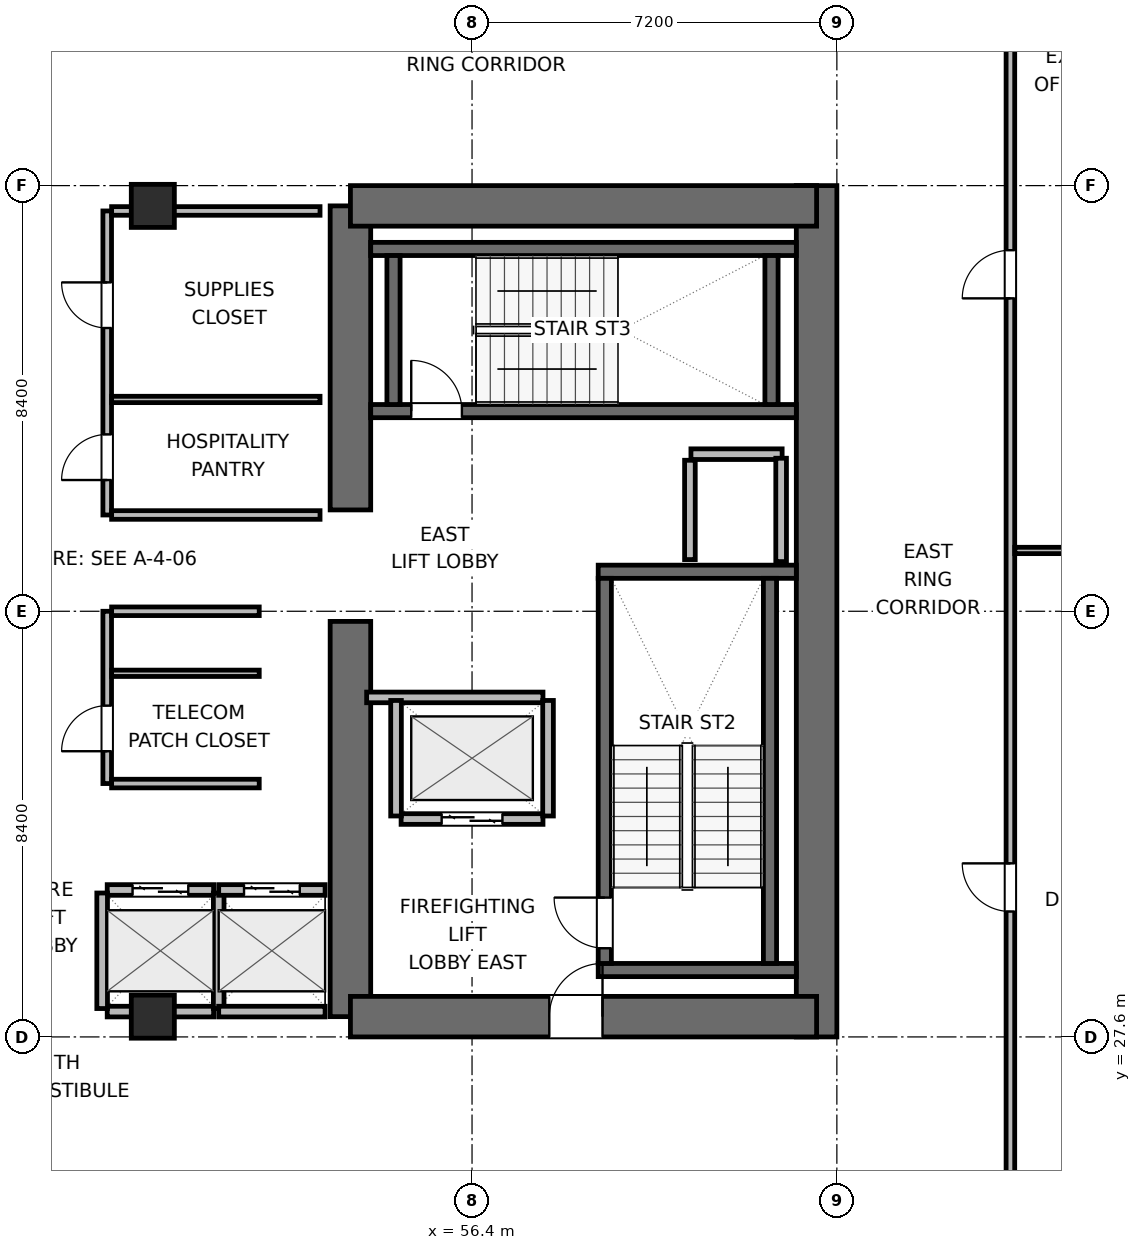
"""IFC4 building model, lengths in metres.
Left out: names, types, materials, properties, quantities, classifications, styles, units other than length and angle.
Written with IfcOpenShell. Run it as: python <this file> out.ifc"""

import sys

from ifc_helpers import new_model, si_unit, direction, frame, frame_2d, origin, origin_2d, place, context, subcontext, project, spatial, rectangle, extrude, element, fill, save


model = new_model("IFC4")
c1 = context("Model", 3, precision=1e-05, world=origin(), true_north=direction((0.0, 1.0)))
c2 = subcontext(c1, "Body", "Model", "MODEL_VIEW")
j1 = project(units=[si_unit("LENGTHUNIT", "METRE"), si_unit("PLANEANGLEUNIT", "RADIAN")], contexts=[c1])
p1 = place(None, origin())
s1 = spatial("IfcSite", under=j1, at=p1, CompositionType="ELEMENT")
p2 = place(p1, origin())
s2 = spatial("IfcBuilding", under=s1, at=p2, CompositionType="ELEMENT")
p3 = place(p2, frame((0.0, 0.0, 101.4)))
s3 = spatial("IfcBuildingStorey", under=s2, at=p3, CompositionType="ELEMENT", Elevation=101.4)
p4 = place(p3, frame((54.0, 28.0, 0.0), z_axis=(0.0, 0.0, 1.0), x_axis=(0.0, 1.0, 0.0)))
e1 = element("IfcWall", 1, at=p4, inside=s3, PredefinedType="SHEAR", context=c2, shape_type="SweptSolid", body=[
    extrude(rectangle(XDim=7.8, YDim=0.8, at=frame_2d((3.9, 0.0))), origin(), (0.0, 0.0, 1.0), 3.9),
])
p5 = place(p3, frame((54.0, 38.0, 0.0), z_axis=(0.0, 0.0, 1.0), x_axis=(0.0, 1.0, 0.0)))
e2 = element("IfcWall", 2, at=p5, inside=s3, PredefinedType="SHEAR", context=c2, shape_type="SweptSolid", body=[
    extrude(rectangle(XDim=6.0, YDim=0.8, at=frame_2d((3.0, 0.0))), origin(), (0.0, 0.0, 1.0), 3.9),
])
p6 = place(p3, frame((63.2, 27.6, 0.0), z_axis=(0.0, 0.0, 1.0), x_axis=(0.0, 1.0, 0.0)))
e3 = element("IfcWall", 3, at=p6, inside=s3, PredefinedType="SHEAR", context=c2, shape_type="SweptSolid", body=[
    extrude(rectangle(XDim=16.8, YDim=0.8, at=frame_2d((8.4, 0.0))), origin(), (0.0, 0.0, 1.0), 3.9),
])
p7 = place(p3, frame((54.0, 28.0, 0.0), z_axis=(0.0, 0.0, 1.0), x_axis=(1.0, 0.0, 0.0)))
e4 = element("IfcWall", 4, at=p7, inside=s3, PredefinedType="SHEAR", context=c2, shape_type="SweptSolid", body=[
    extrude(rectangle(XDim=9.2, YDim=0.8, at=frame_2d((4.6, 0.0))), origin(), (0.0, 0.0, 1.0), 3.9),
])
p8 = place(p7, frame((3.925, 0.0, 0.0)))
e5 = element("IfcOpeningElement", 5, at=p8, cuts=e4, PredefinedType="OPENING", context=c2, shape_type="SweptSolid", body=[
    extrude(rectangle(XDim=1.05, YDim=2.04, at=frame_2d((0.525, 1.02))), frame((0.0, 0.41, 0.0), z_axis=(0.0, -1.0, 0.0), x_axis=(1.0, 0.0, 0.0)), (0.0, 0.0, 1.0), 0.82),
])
p9 = place(p3, frame((54.0, 44.0, 0.0), z_axis=(0.0, 0.0, 1.0), x_axis=(1.0, 0.0, 0.0)))
e6 = element("IfcWall", 6, at=p9, inside=s3, PredefinedType="SHEAR", context=c2, shape_type="SweptSolid", body=[
    extrude(rectangle(XDim=9.2, YDim=0.8, at=frame_2d((4.6, 0.0))), origin(), (0.0, 0.0, 1.0), 3.9),
])
for number, where, z_axis, x_axis in (
    (7, (58.89, 28.92, 0.0), (0.0, 0.0, 1.0), (1.0, 0.0, 0.0)),
    (8, (58.89, 36.78, 0.0), (0.0, 0.0, 1.0), (1.0, 0.0, 0.0)),
):
    element("IfcWall", number, at=place(p3, frame(where, z_axis=z_axis, x_axis=x_axis)), inside=s3, PredefinedType="SHEAR", context=c2, shape_type="SweptSolid", body=[
        extrude(rectangle(XDim=3.91, YDim=0.26, at=frame_2d((1.955, 0.0))), origin(), (0.0, 0.0, 1.0), 3.9),
    ])
p10 = place(p3, frame((59.02, 29.05, 0.0), z_axis=(0.0, 0.0, 1.0), x_axis=(0.0, 1.0, 0.0)))
e9 = element("IfcWall", 9, at=p10, inside=s3, PredefinedType="SHEAR", context=c2, shape_type="SweptSolid", body=[
    extrude(rectangle(XDim=7.6, YDim=0.26, at=frame_2d((3.8, 0.0))), origin(), (0.0, 0.0, 1.0), 3.9),
])
p11 = place(p10, frame((0.3, 0.0, 0.0)))
e10 = element("IfcOpeningElement", 10, at=p11, cuts=e9, PredefinedType="OPENING", context=c2, shape_type="SweptSolid", body=[
    extrude(rectangle(XDim=1.0, YDim=2.04, at=frame_2d((0.5, 1.02))), frame((0.0, 0.14, 0.0), z_axis=(0.0, -1.0, 0.0), x_axis=(1.0, 0.0, 0.0)), (0.0, 0.0, 1.0), 0.28),
])
p12 = place(p3, frame((62.28, 29.05, 0.0), z_axis=(0.0, 0.0, 1.0), x_axis=(0.0, 1.0, 0.0)))
e11 = element("IfcWall", 11, at=p12, inside=s3, PredefinedType="SHEAR", context=c2, shape_type="SweptSolid", body=[
    extrude(rectangle(XDim=7.6, YDim=0.26, at=frame_2d((3.8, 0.0))), origin(), (0.0, 0.0, 1.0), 3.9),
])
p13 = place(p3, frame((54.4, 39.95, 0.0), z_axis=(0.0, 0.0, 1.0), x_axis=(1.0, 0.0, 0.0)))
e12 = element("IfcWall", 12, at=p13, inside=s3, PredefinedType="SHEAR", context=c2, shape_type="SweptSolid", body=[
    extrude(rectangle(XDim=8.4, YDim=0.26, at=frame_2d((4.2, 0.0))), origin(), (0.0, 0.0, 1.0), 3.9),
])
p14 = place(p13, frame((0.8, 0.0, 0.0)))
e13 = element("IfcOpeningElement", 13, at=p14, cuts=e12, PredefinedType="OPENING", context=c2, shape_type="SweptSolid", body=[
    extrude(rectangle(XDim=1.0, YDim=2.04, at=frame_2d((0.5, 1.02))), frame((0.0, 0.14, 0.0), z_axis=(0.0, -1.0, 0.0), x_axis=(1.0, 0.0, 0.0)), (0.0, 0.0, 1.0), 0.28),
])
p15 = place(p3, frame((54.4, 43.15, 0.0), z_axis=(0.0, 0.0, 1.0), x_axis=(1.0, 0.0, 0.0)))
e14 = element("IfcWall", 14, at=p15, inside=s3, PredefinedType="SHEAR", context=c2, shape_type="SweptSolid", body=[
    extrude(rectangle(XDim=8.4, YDim=0.26, at=frame_2d((4.2, 0.0))), origin(), (0.0, 0.0, 1.0), 3.9),
])
for number, where, z_axis, x_axis in (
    (15, (54.85, 40.08, 0.0), (0.0, 0.0, 1.0), (0.0, 1.0, 0.0)),
    (16, (62.31, 40.08, 0.0), (0.0, 0.0, 1.0), (0.0, 1.0, 0.0)),
):
    element("IfcWall", number, at=place(p3, frame(where, z_axis=z_axis, x_axis=x_axis)), inside=s3, PredefinedType="SHEAR", context=c2, shape_type="SweptSolid", body=[
        extrude(rectangle(XDim=2.94, YDim=0.26, at=frame_2d((1.47, 0.0))), origin(), (0.0, 0.0, 1.0), 3.9),
    ])
for number, where, z_axis, x_axis in (
    (17, (50.1, 28.0, 0.0), (0.0, 0.0, 1.0), (1.0, 0.0, 0.0)),
    (18, (50.1, 44.0, 0.0), (0.0, 0.0, 1.0), (1.0, 0.0, 0.0)),
):
    element("IfcColumn", number, at=place(p3, frame(where, z_axis=z_axis, x_axis=x_axis)), inside=s3, PredefinedType="COLUMN", context=c2, shape_type="SweptSolid", body=[
        extrude(rectangle(XDim=0.85, YDim=0.85, at=origin_2d()), origin(), (0.0, 0.0, 1.0), 3.9),
    ])
p16 = place(p3, frame((60.72, 39.1, 0.0), z_axis=(0.0, 0.0, 1.0), x_axis=(1.0, 0.0, 0.0)))
e19 = element("IfcWall", 19, at=p16, inside=s3, PredefinedType="PARTITIONING", context=c2, shape_type="SweptSolid", body=[
    extrude(rectangle(XDim=1.8, YDim=0.21, at=frame_2d((0.9, 0.0))), origin(), (0.0, 0.0, 1.0), 3.64),
])
p17 = place(p3, frame((60.7, 37.02, 0.0), z_axis=(0.0, 0.0, 1.0), x_axis=(0.0, 1.0, 0.0)))
e20 = element("IfcWall", 20, at=p17, inside=s3, PredefinedType="PARTITIONING", context=c2, shape_type="SweptSolid", body=[
    extrude(rectangle(XDim=1.96, YDim=0.21, at=frame_2d((0.98, 0.0))), origin(), (0.0, 0.0, 1.0), 3.64),
])
p18 = place(p3, frame((62.5, 36.98, 0.0), z_axis=(0.0, 0.0, 1.0), x_axis=(0.0, 1.0, 0.0)))
e21 = element("IfcWall", 21, at=p18, inside=s3, PredefinedType="PARTITIONING", context=c2, shape_type="SweptSolid", body=[
    extrude(rectangle(XDim=2.04, YDim=0.21, at=frame_2d((1.02, 0.0))), origin(), (0.0, 0.0, 1.0), 3.64),
])
p19 = place(p3, frame((55.0, 31.9, 0.0), z_axis=(0.0, 0.0, 1.0), x_axis=(1.0, 0.0, 0.0)))
e22 = element("IfcWall", 22, at=p19, inside=s3, PredefinedType="PARTITIONING", context=c2, shape_type="SweptSolid", body=[
    extrude(rectangle(XDim=2.8, YDim=0.21, at=frame_2d((1.4, 0.0))), origin(), (0.0, 0.0, 1.0), 3.64),
])
p20 = place(p19, frame((0.8, 0.0, 0.0)))
e23 = element("IfcOpeningElement", 23, at=p20, cuts=e22, PredefinedType="OPENING", context=c2, shape_type="SweptSolid", body=[
    extrude(rectangle(XDim=1.2, YDim=2.04, at=frame_2d((0.6, 1.02))), frame((0.0, 0.115, 0.0), z_axis=(0.0, -1.0, 0.0), x_axis=(1.0, 0.0, 0.0)), (0.0, 0.0, 1.0), 0.23),
])
p21 = place(p3, frame((54.32, 34.3, 0.0), z_axis=(0.0, 0.0, 1.0), x_axis=(1.0, 0.0, 0.0)))
e24 = element("IfcWall", 24, at=p21, inside=s3, PredefinedType="PARTITIONING", context=c2, shape_type="SweptSolid", body=[
    extrude(rectangle(XDim=3.48, YDim=0.21, at=frame_2d((1.74, 0.0))), origin(), (0.0, 0.0, 1.0), 3.64),
])
for number, where, z_axis, x_axis in (
    (25, (54.9, 31.96, 0.0), (0.0, 0.0, 1.0), (0.0, 1.0, 0.0)),
    (26, (57.9, 31.96, 0.0), (0.0, 0.0, 1.0), (0.0, 1.0, 0.0)),
):
    element("IfcWall", number, at=place(p3, frame(where, z_axis=z_axis, x_axis=x_axis)), inside=s3, PredefinedType="PARTITIONING", context=c2, shape_type="SweptSolid", body=[
        extrude(rectangle(XDim=2.28, YDim=0.21, at=frame_2d((1.14, 0.0))), origin(), (0.0, 0.0, 1.0), 3.64),
    ])
p22 = place(p3, frame((49.2, 30.5, 0.0), z_axis=(0.0, 0.0, 1.0), x_axis=(1.0, 0.0, 0.0)))
e27 = element("IfcWall", 27, at=p22, inside=s3, PredefinedType="PARTITIONING", context=c2, shape_type="SweptSolid", body=[
    extrude(rectangle(XDim=2.1, YDim=0.21, at=frame_2d((1.05, 0.0))), origin(), (0.0, 0.0, 1.0), 3.64),
])
p23 = place(p22, frame((0.5, 0.0, 0.0)))
e28 = element("IfcOpeningElement", 28, at=p23, cuts=e27, PredefinedType="OPENING", context=c2, shape_type="SweptSolid", body=[
    extrude(rectangle(XDim=1.1, YDim=2.04, at=frame_2d((0.55, 1.02))), frame((0.0, 0.115, 0.0), z_axis=(0.0, -1.0, 0.0), x_axis=(1.0, 0.0, 0.0)), (0.0, 0.0, 1.0), 0.23),
])
p24 = place(p3, frame((49.2, 28.1, 0.0), z_axis=(0.0, 0.0, 1.0), x_axis=(1.0, 0.0, 0.0)))
e29 = element("IfcWall", 29, at=p24, inside=s3, PredefinedType="PARTITIONING", context=c2, shape_type="SweptSolid", body=[
    extrude(rectangle(XDim=2.1, YDim=0.21, at=frame_2d((1.05, 0.0))), origin(), (0.0, 0.0, 1.0), 2.525),
])
for number, where, z_axis, x_axis in (
    (30, (49.1, 28.16, 0.0), (0.0, 0.0, 1.0), (0.0, 1.0, 0.0)),
    (31, (51.4, 28.16, 0.0), (0.0, 0.0, 1.0), (0.0, 1.0, 0.0)),
):
    element("IfcWall", number, at=place(p3, frame(where, z_axis=z_axis, x_axis=x_axis)), inside=s3, PredefinedType="PARTITIONING", context=c2, shape_type="SweptSolid", body=[
        extrude(rectangle(XDim=2.28, YDim=0.21, at=frame_2d((1.14, 0.0))), origin(), (0.0, 0.0, 1.0), 3.64),
    ])
p25 = place(p3, frame((51.4, 30.5, 0.0), z_axis=(0.0, 0.0, 1.0), x_axis=(1.0, 0.0, 0.0)))
e32 = element("IfcWall", 32, at=p25, inside=s3, PredefinedType="PARTITIONING", context=c2, shape_type="SweptSolid", body=[
    extrude(rectangle(XDim=2.1, YDim=0.21, at=frame_2d((1.05, 0.0))), origin(), (0.0, 0.0, 1.0), 3.64),
])
p26 = place(p25, frame((0.5, 0.0, 0.0)))
e33 = element("IfcOpeningElement", 33, at=p26, cuts=e32, PredefinedType="OPENING", context=c2, shape_type="SweptSolid", body=[
    extrude(rectangle(XDim=1.1, YDim=2.04, at=frame_2d((0.55, 1.02))), frame((0.0, 0.115, 0.0), z_axis=(0.0, -1.0, 0.0), x_axis=(1.0, 0.0, 0.0)), (0.0, 0.0, 1.0), 0.23),
])
p27 = place(p3, frame((51.4, 28.1, 0.0), z_axis=(0.0, 0.0, 1.0), x_axis=(1.0, 0.0, 0.0)))
e34 = element("IfcWall", 34, at=p27, inside=s3, PredefinedType="PARTITIONING", context=c2, shape_type="SweptSolid", body=[
    extrude(rectangle(XDim=2.1, YDim=0.21, at=frame_2d((1.05, 0.0))), origin(), (0.0, 0.0, 1.0), 2.525),
])
p28 = place(p3, frame((49.2, 32.6, 0.0), z_axis=(0.0, 0.0, 1.0), x_axis=(0.0, 1.0, 0.0)))
e35 = element("IfcWall", 35, at=p28, inside=s3, PredefinedType="PARTITIONING", context=c2, shape_type="SweptSolid", body=[
    extrude(rectangle(XDim=3.4, YDim=0.17, at=frame_2d((1.7, 0.0))), origin(), (0.0, 0.0, 1.0), 3.64),
])
p29 = place(p28, frame((0.638, 0.0, 0.0)))
e36 = element("IfcOpeningElement", 36, at=p29, cuts=e35, PredefinedType="OPENING", context=c2, shape_type="SweptSolid", body=[
    extrude(rectangle(XDim=0.9, YDim=2.02, at=frame_2d((0.45, 1.01))), frame((0.0, 0.095, 0.0), z_axis=(0.0, -1.0, 0.0), x_axis=(1.0, 0.0, 0.0)), (0.0, 0.0, 1.0), 0.19),
])
for number, where, z_axis, x_axis in (
    (37, (49.287, 32.6, 0.0), (0.0, 0.0, 1.0), (1.0, 0.0, 0.0)),
    (38, (49.287, 36.0, 0.0), (0.0, 0.0, 1.0), (1.0, 0.0, 0.0)),
):
    element("IfcWall", number, at=place(p3, frame(where, z_axis=z_axis, x_axis=x_axis)), inside=s3, PredefinedType="PARTITIONING", context=c2, shape_type="SweptSolid", body=[
        extrude(rectangle(XDim=2.913, YDim=0.17, at=frame_2d((1.457, 0.0))), origin(), (0.0, 0.0, 1.0), 3.64),
    ])
p30 = place(p3, frame((49.287, 34.776, 0.0), z_axis=(0.0, 0.0, 1.0), x_axis=(1.0, 0.0, 0.0)))
e39 = element("IfcWall", 39, at=p30, inside=s3, PredefinedType="PARTITIONING", context=c2, shape_type="SweptSolid", body=[
    extrude(rectangle(XDim=2.913, YDim=0.125, at=frame_2d((1.457, 0.0))), origin(), (0.0, 0.0, 1.0), 3.64),
])
p31 = place(p3, frame((49.2, 37.9, 0.0), z_axis=(0.0, 0.0, 1.0), x_axis=(0.0, 1.0, 0.0)))
e40 = element("IfcWall", 40, at=p31, inside=s3, PredefinedType="PARTITIONING", context=c2, shape_type="SweptSolid", body=[
    extrude(rectangle(XDim=6.0, YDim=0.17, at=frame_2d((3.0, 0.0))), origin(), (0.0, 0.0, 1.0), 3.64),
])
p32 = place(p31, frame((0.69, 0.0, 0.0)))
e41 = element("IfcOpeningElement", 41, at=p32, cuts=e40, PredefinedType="OPENING", context=c2, shape_type="SweptSolid", body=[
    extrude(rectangle(XDim=0.9, YDim=2.02, at=frame_2d((0.45, 1.01))), frame((0.0, 0.095, 0.0), z_axis=(0.0, -1.0, 0.0), x_axis=(1.0, 0.0, 0.0)), (0.0, 0.0, 1.0), 0.19),
])
p33 = place(p31, frame((3.69, 0.0, 0.0)))
e42 = element("IfcOpeningElement", 42, at=p33, cuts=e40, PredefinedType="OPENING", context=c2, shape_type="SweptSolid", body=[
    extrude(rectangle(XDim=0.9, YDim=2.02, at=frame_2d((0.45, 1.01))), frame((0.0, 0.095, 0.0), z_axis=(0.0, -1.0, 0.0), x_axis=(1.0, 0.0, 0.0)), (0.0, 0.0, 1.0), 0.19),
])
p34 = place(p3, frame((49.287, 37.9, 0.0), z_axis=(0.0, 0.0, 1.0), x_axis=(1.0, 0.0, 0.0)))
e43 = element("IfcWall", 43, at=p34, inside=s3, PredefinedType="PARTITIONING", context=c2, shape_type="SweptSolid", body=[
    extrude(rectangle(XDim=4.113, YDim=0.17, at=frame_2d((2.056, 0.0))), origin(), (0.0, 0.0, 1.0), 3.64),
])
p35 = place(p3, frame((49.287, 43.9, 0.0), z_axis=(0.0, 0.0, 1.0), x_axis=(1.0, 0.0, 0.0)))
e44 = element("IfcWall", 44, at=p35, inside=s3, PredefinedType="PARTITIONING", context=c2, shape_type="SweptSolid", body=[
    extrude(rectangle(XDim=4.113, YDim=0.17, at=frame_2d((2.056, 0.0))), origin(), (0.0, 0.0, 1.0), 2.525),
])
p36 = place(p3, frame((49.287, 40.18, 0.0), z_axis=(0.0, 0.0, 1.0), x_axis=(1.0, 0.0, 0.0)))
e45 = element("IfcWall", 45, at=p36, inside=s3, PredefinedType="PARTITIONING", context=c2, shape_type="SweptSolid", body=[
    extrude(rectangle(XDim=4.113, YDim=0.125, at=frame_2d((2.056, 0.0))), origin(), (0.0, 0.0, 1.0), 3.64),
])
p37 = place(p3, frame((67.025, 23.987, 0.0), z_axis=(0.0, 0.0, 1.0), x_axis=(0.0, 1.0, 0.0)))
e46 = element("IfcWall", 46, at=p37, inside=s3, PredefinedType="PARTITIONING", context=c2, shape_type="SweptSolid", body=[
    extrude(rectangle(XDim=24.026, YDim=0.17, at=frame_2d((12.013, 0.0))), origin(), (0.0, 0.0, 1.0), 3.64),
])
p38 = place(p37, frame((6.088, 0.0, 0.0)))
e47 = element("IfcOpeningElement", 47, at=p38, cuts=e46, PredefinedType="OPENING", context=c2, shape_type="SweptSolid", body=[
    extrude(rectangle(XDim=0.95, YDim=2.04, at=frame_2d((0.475, 1.02))), frame((0.0, 0.095, 0.0), z_axis=(0.0, -1.0, 0.0), x_axis=(1.0, 0.0, 0.0)), (0.0, 0.0, 1.0), 0.19),
])
p39 = place(p37, frame((18.188, 0.0, 0.0)))
e48 = element("IfcOpeningElement", 48, at=p39, cuts=e46, PredefinedType="OPENING", context=c2, shape_type="SweptSolid", body=[
    extrude(rectangle(XDim=0.95, YDim=2.04, at=frame_2d((0.475, 1.02))), frame((0.0, 0.095, 0.0), z_axis=(0.0, -1.0, 0.0), x_axis=(1.0, 0.0, 0.0)), (0.0, 0.0, 1.0), 0.19),
])
p40 = place(p3, frame((67.112, 37.2, 0.0), z_axis=(0.0, 0.0, 1.0), x_axis=(1.0, 0.0, 0.0)))
e49 = element("IfcWall", 49, at=p40, inside=s3, PredefinedType="PARTITIONING", context=c2, shape_type="SweptSolid", body=[
    extrude(rectangle(XDim=3.443, YDim=0.125, at=frame_2d((1.721, 0.0))), origin(), (0.0, 0.0, 1.0), 3.64),
])
p41 = place(p11, origin())
e50 = element("IfcDoor", 50, at=p41, inside=s3, OperationType="SINGLE_SWING_RIGHT", PredefinedType="DOOR", context=c2, shape_type="SweptSolid", body=[
    extrude(rectangle(XDim=1.0, YDim=2.04, at=frame_2d((0.5, 1.02))), frame((0.0, 0.025, 0.0), z_axis=(0.0, -1.0, 0.0), x_axis=(1.0, 0.0, 0.0)), (0.0, 0.0, 1.0), 0.05),
])
fill(e10, e50)
p42 = place(p14, origin())
e51 = element("IfcDoor", 51, at=p42, inside=s3, OperationType="SINGLE_SWING_LEFT", PredefinedType="DOOR", context=c2, shape_type="SweptSolid", body=[
    extrude(rectangle(XDim=1.0, YDim=2.04, at=frame_2d((0.5, 1.02))), frame((0.0, 0.025, 0.0), z_axis=(0.0, -1.0, 0.0), x_axis=(1.0, 0.0, 0.0)), (0.0, 0.0, 1.0), 0.05),
])
fill(e13, e51)
p43 = place(p20, origin())
e52 = element("IfcDoor", 52, at=p43, inside=s3, OperationType="DOUBLE_DOOR_SLIDING", PredefinedType="DOOR", context=c2, shape_type="SweptSolid", body=[
    extrude(rectangle(XDim=1.2, YDim=2.04, at=frame_2d((0.6, 1.02))), frame((0.0, 0.025, 0.0), z_axis=(0.0, -1.0, 0.0), x_axis=(1.0, 0.0, 0.0)), (0.0, 0.0, 1.0), 0.05),
])
fill(e23, e52)
p44 = place(p23, origin())
e53 = element("IfcDoor", 53, at=p44, inside=s3, OperationType="DOUBLE_DOOR_SLIDING", PredefinedType="DOOR", context=c2, shape_type="SweptSolid", body=[
    extrude(rectangle(XDim=1.1, YDim=2.04, at=frame_2d((0.55, 1.02))), frame((0.0, 0.025, 0.0), z_axis=(0.0, -1.0, 0.0), x_axis=(1.0, 0.0, 0.0)), (0.0, 0.0, 1.0), 0.05),
])
fill(e28, e53)
p45 = place(p26, origin())
e54 = element("IfcDoor", 54, at=p45, inside=s3, OperationType="DOUBLE_DOOR_SLIDING", PredefinedType="DOOR", context=c2, shape_type="SweptSolid", body=[
    extrude(rectangle(XDim=1.1, YDim=2.04, at=frame_2d((0.55, 1.02))), frame((0.0, 0.025, 0.0), z_axis=(0.0, -1.0, 0.0), x_axis=(1.0, 0.0, 0.0)), (0.0, 0.0, 1.0), 0.05),
])
fill(e33, e54)
p46 = place(p8, origin())
e55 = element("IfcDoor", 55, at=p46, inside=s3, OperationType="SINGLE_SWING_RIGHT", PredefinedType="DOOR", context=c2, shape_type="SweptSolid", body=[
    extrude(rectangle(XDim=1.05, YDim=2.04, at=frame_2d((0.525, 1.02))), frame((0.0, 0.025, 0.0), z_axis=(0.0, -1.0, 0.0), x_axis=(1.0, 0.0, 0.0)), (0.0, 0.0, 1.0), 0.05),
])
fill(e5, e55)
p47 = place(p29, origin())
e56 = element("IfcDoor", 56, at=p47, inside=s3, OperationType="SINGLE_SWING_LEFT", PredefinedType="DOOR", context=c2, shape_type="SweptSolid", body=[
    extrude(rectangle(XDim=0.9, YDim=2.02, at=frame_2d((0.45, 1.01))), frame((0.0, 0.025, 0.0), z_axis=(0.0, -1.0, 0.0), x_axis=(1.0, 0.0, 0.0)), (0.0, 0.0, 1.0), 0.05),
])
fill(e36, e56)
p48 = place(p32, origin())
e57 = element("IfcDoor", 57, at=p48, inside=s3, OperationType="SINGLE_SWING_LEFT", PredefinedType="DOOR", context=c2, shape_type="SweptSolid", body=[
    extrude(rectangle(XDim=0.9, YDim=2.02, at=frame_2d((0.45, 1.01))), frame((0.0, 0.025, 0.0), z_axis=(0.0, -1.0, 0.0), x_axis=(1.0, 0.0, 0.0)), (0.0, 0.0, 1.0), 0.05),
])
fill(e41, e57)
p49 = place(p33, origin())
e58 = element("IfcDoor", 58, at=p49, inside=s3, OperationType="SINGLE_SWING_RIGHT", PredefinedType="DOOR", context=c2, shape_type="SweptSolid", body=[
    extrude(rectangle(XDim=0.9, YDim=2.02, at=frame_2d((0.45, 1.01))), frame((0.0, 0.025, 0.0), z_axis=(0.0, -1.0, 0.0), x_axis=(1.0, 0.0, 0.0)), (0.0, 0.0, 1.0), 0.05),
])
fill(e42, e58)
p50 = place(p38, origin())
e59 = element("IfcDoor", 59, at=p50, inside=s3, OperationType="SINGLE_SWING_RIGHT", PredefinedType="DOOR", context=c2, shape_type="SweptSolid", body=[
    extrude(rectangle(XDim=0.95, YDim=2.04, at=frame_2d((0.475, 1.02))), frame((0.0, 0.025, 0.0), z_axis=(0.0, -1.0, 0.0), x_axis=(1.0, 0.0, 0.0)), (0.0, 0.0, 1.0), 0.05),
])
fill(e47, e59)
p51 = place(p39, origin())
e60 = element("IfcDoor", 60, at=p51, inside=s3, OperationType="SINGLE_SWING_LEFT", PredefinedType="DOOR", context=c2, shape_type="SweptSolid", body=[
    extrude(rectangle(XDim=0.95, YDim=2.04, at=frame_2d((0.475, 1.02))), frame((0.0, 0.025, 0.0), z_axis=(0.0, -1.0, 0.0), x_axis=(1.0, 0.0, 0.0)), (0.0, 0.0, 1.0), 0.05),
])
fill(e48, e60)
save(model, sys.argv[1])
